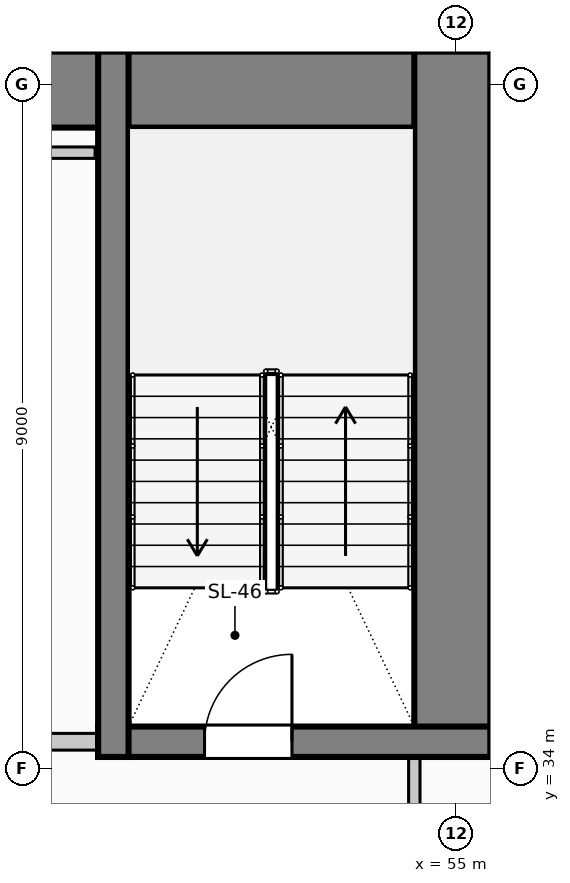
"""IFC4 building model, lengths in metres.
Left out: names, types, materials, properties, quantities, classifications, styles, units other than length and angle.
Written with IfcOpenShell. Run it as: python <this file> out.ifc"""

import sys

from ifc_helpers import new_model, si_unit, direction, frame, frame_2d, origin, place, context, subcontext, project, spatial, rectangle, extrude, element, fill, save


model = new_model("IFC4")
c1 = context("Model", 3, precision=1e-05, world=origin(), true_north=direction((0.0, 1.0)))
c2 = subcontext(c1, "Body", "Model", "MODEL_VIEW")
j1 = project(units=[si_unit("LENGTHUNIT", "METRE"), si_unit("PLANEANGLEUNIT", "RADIAN")], contexts=[c1])
p1 = place(None, origin())
s1 = spatial("IfcSite", under=j1, at=p1, CompositionType="ELEMENT")
p2 = place(p1, origin())
s2 = spatial("IfcBuilding", under=s1, at=p2, CompositionType="ELEMENT")
p3 = place(p2, frame((0.0, 0.0, 22.6)))
s3 = spatial("IfcBuildingStorey", under=s2, at=p3, CompositionType="ELEMENT", Elevation=22.6)
p4 = place(p3, frame((40.55, 42.93, 0.0), z_axis=(0.0, 0.0, 1.0), x_axis=(1.0, 0.0, 0.0)))
e1 = element("IfcWall", 1, at=p4, inside=s3, PredefinedType="SHEAR", context=c2, shape_type="SweptSolid", body=[
    extrude(rectangle(XDim=14.9, YDim=1.0, at=frame_2d((7.45, 0.0))), origin(), (0.0, 0.0, 1.0), 4.0),
])
p5 = place(p3, frame((54.95, 34.15, 0.0), z_axis=(0.0, 0.0, 1.0), x_axis=(0.0, 1.0, 0.0)))
e2 = element("IfcWall", 2, at=p5, inside=s3, PredefinedType="SHEAR", context=c2, shape_type="SweptSolid", body=[
    extrude(rectangle(XDim=9.28, YDim=1.0, at=frame_2d((4.64, 0.0))), origin(), (0.0, 0.0, 1.0), 4.0),
])
p6 = place(p3, frame((50.29, 34.35, 0.0), z_axis=(0.0, 0.0, 1.0), x_axis=(1.0, 0.0, 0.0)))
e3 = element("IfcWall", 3, at=p6, inside=s3, PredefinedType="SHEAR", context=c2, shape_type="SweptSolid", body=[
    extrude(rectangle(XDim=5.16, YDim=0.4, at=frame_2d((2.58, 0.0))), origin(), (0.0, 0.0, 1.0), 4.0),
])
p7 = place(p6, frame((1.4, 0.0, 0.0)))
e4 = element("IfcOpeningElement", 4, at=p7, cuts=e3, PredefinedType="OPENING", context=c2, shape_type="SweptSolid", body=[
    extrude(rectangle(XDim=1.15, YDim=2.2, at=frame_2d((0.575, 1.1))), frame((0.0, 0.21, 0.0), z_axis=(0.0, -1.0, 0.0), x_axis=(1.0, 0.0, 0.0)), (0.0, 0.0, 1.0), 0.42),
])
p8 = place(p3, frame((50.49, 34.15, 0.0), z_axis=(0.0, 0.0, 1.0), x_axis=(0.0, 1.0, 0.0)))
e5 = element("IfcWall", 5, at=p8, inside=s3, PredefinedType="SHEAR", context=c2, shape_type="SweptSolid", body=[
    extrude(rectangle(XDim=9.28, YDim=0.4, at=frame_2d((4.64, 0.0))), origin(), (0.0, 0.0, 1.0), 4.0),
])
p9 = place(p3, frame((45.72, 34.35, 0.0), z_axis=(0.0, 0.0, 1.0), x_axis=(1.0, 0.0, 0.0)))
e6 = element("IfcWall", 6, at=p9, inside=s3, PredefinedType="PARTITIONING", context=c2, shape_type="SweptSolid", body=[
    extrude(rectangle(XDim=4.56, YDim=0.22, at=frame_2d((2.28, 0.0))), origin(), (0.0, 0.0, 1.0), 3.7),
])
p10 = place(p9, frame((0.65, 0.0, 0.0)))
e7 = element("IfcOpeningElement", 7, at=p10, cuts=e6, PredefinedType="OPENING", context=c2, shape_type="SweptSolid", body=[
    extrude(rectangle(XDim=0.92, YDim=2.1, at=frame_2d((0.46, 1.05))), frame((0.0, 0.12, 0.0), z_axis=(0.0, -1.0, 0.0), x_axis=(1.0, 0.0, 0.0)), (0.0, 0.0, 1.0), 0.24),
])
p11 = place(p9, frame((2.95, 0.0, 0.0)))
e8 = element("IfcOpeningElement", 8, at=p11, cuts=e6, PredefinedType="OPENING", context=c2, shape_type="SweptSolid", body=[
    extrude(rectangle(XDim=0.88, YDim=2.1, at=frame_2d((0.44, 1.05))), frame((0.0, 0.12, 0.0), z_axis=(0.0, -1.0, 0.0), x_axis=(1.0, 0.0, 0.0)), (0.0, 0.0, 1.0), 0.24),
])
p12 = place(p3, frame((48.0, 42.1, 0.0), z_axis=(0.0, 0.0, 1.0), x_axis=(1.0, 0.0, 0.0)))
e9 = element("IfcWall", 9, at=p12, inside=s3, PredefinedType="PARTITIONING", context=c2, shape_type="SweptSolid", body=[
    extrude(rectangle(XDim=2.25, YDim=0.15, at=frame_2d((1.125, 0.0))), origin(), (0.0, 0.0, 1.0), 3.7),
])
p13 = place(p3, frame((54.45, 32.413, 0.0), z_axis=(0.0, 0.0, 1.0), x_axis=(0.0, 1.0, 0.0)))
e10 = element("IfcWall", 10, at=p13, inside=s3, PredefinedType="PARTITIONING", context=c2, shape_type="SweptSolid", body=[
    extrude(rectangle(XDim=1.737, YDim=0.15, at=frame_2d((0.869, 0.0))), origin(), (0.0, 0.0, 1.0), 3.7),
])
p14 = place(p7, origin())
e11 = element("IfcDoor", 11, at=p14, inside=s3, OperationType="SINGLE_SWING_RIGHT", PredefinedType="DOOR", context=c2, shape_type="SweptSolid", body=[
    extrude(rectangle(XDim=1.15, YDim=2.2, at=frame_2d((0.575, 1.1))), frame((0.0, 0.025, 0.0), z_axis=(0.0, -1.0, 0.0), x_axis=(1.0, 0.0, 0.0)), (0.0, 0.0, 1.0), 0.05),
])
fill(e4, e11)
save(model, sys.argv[1])
